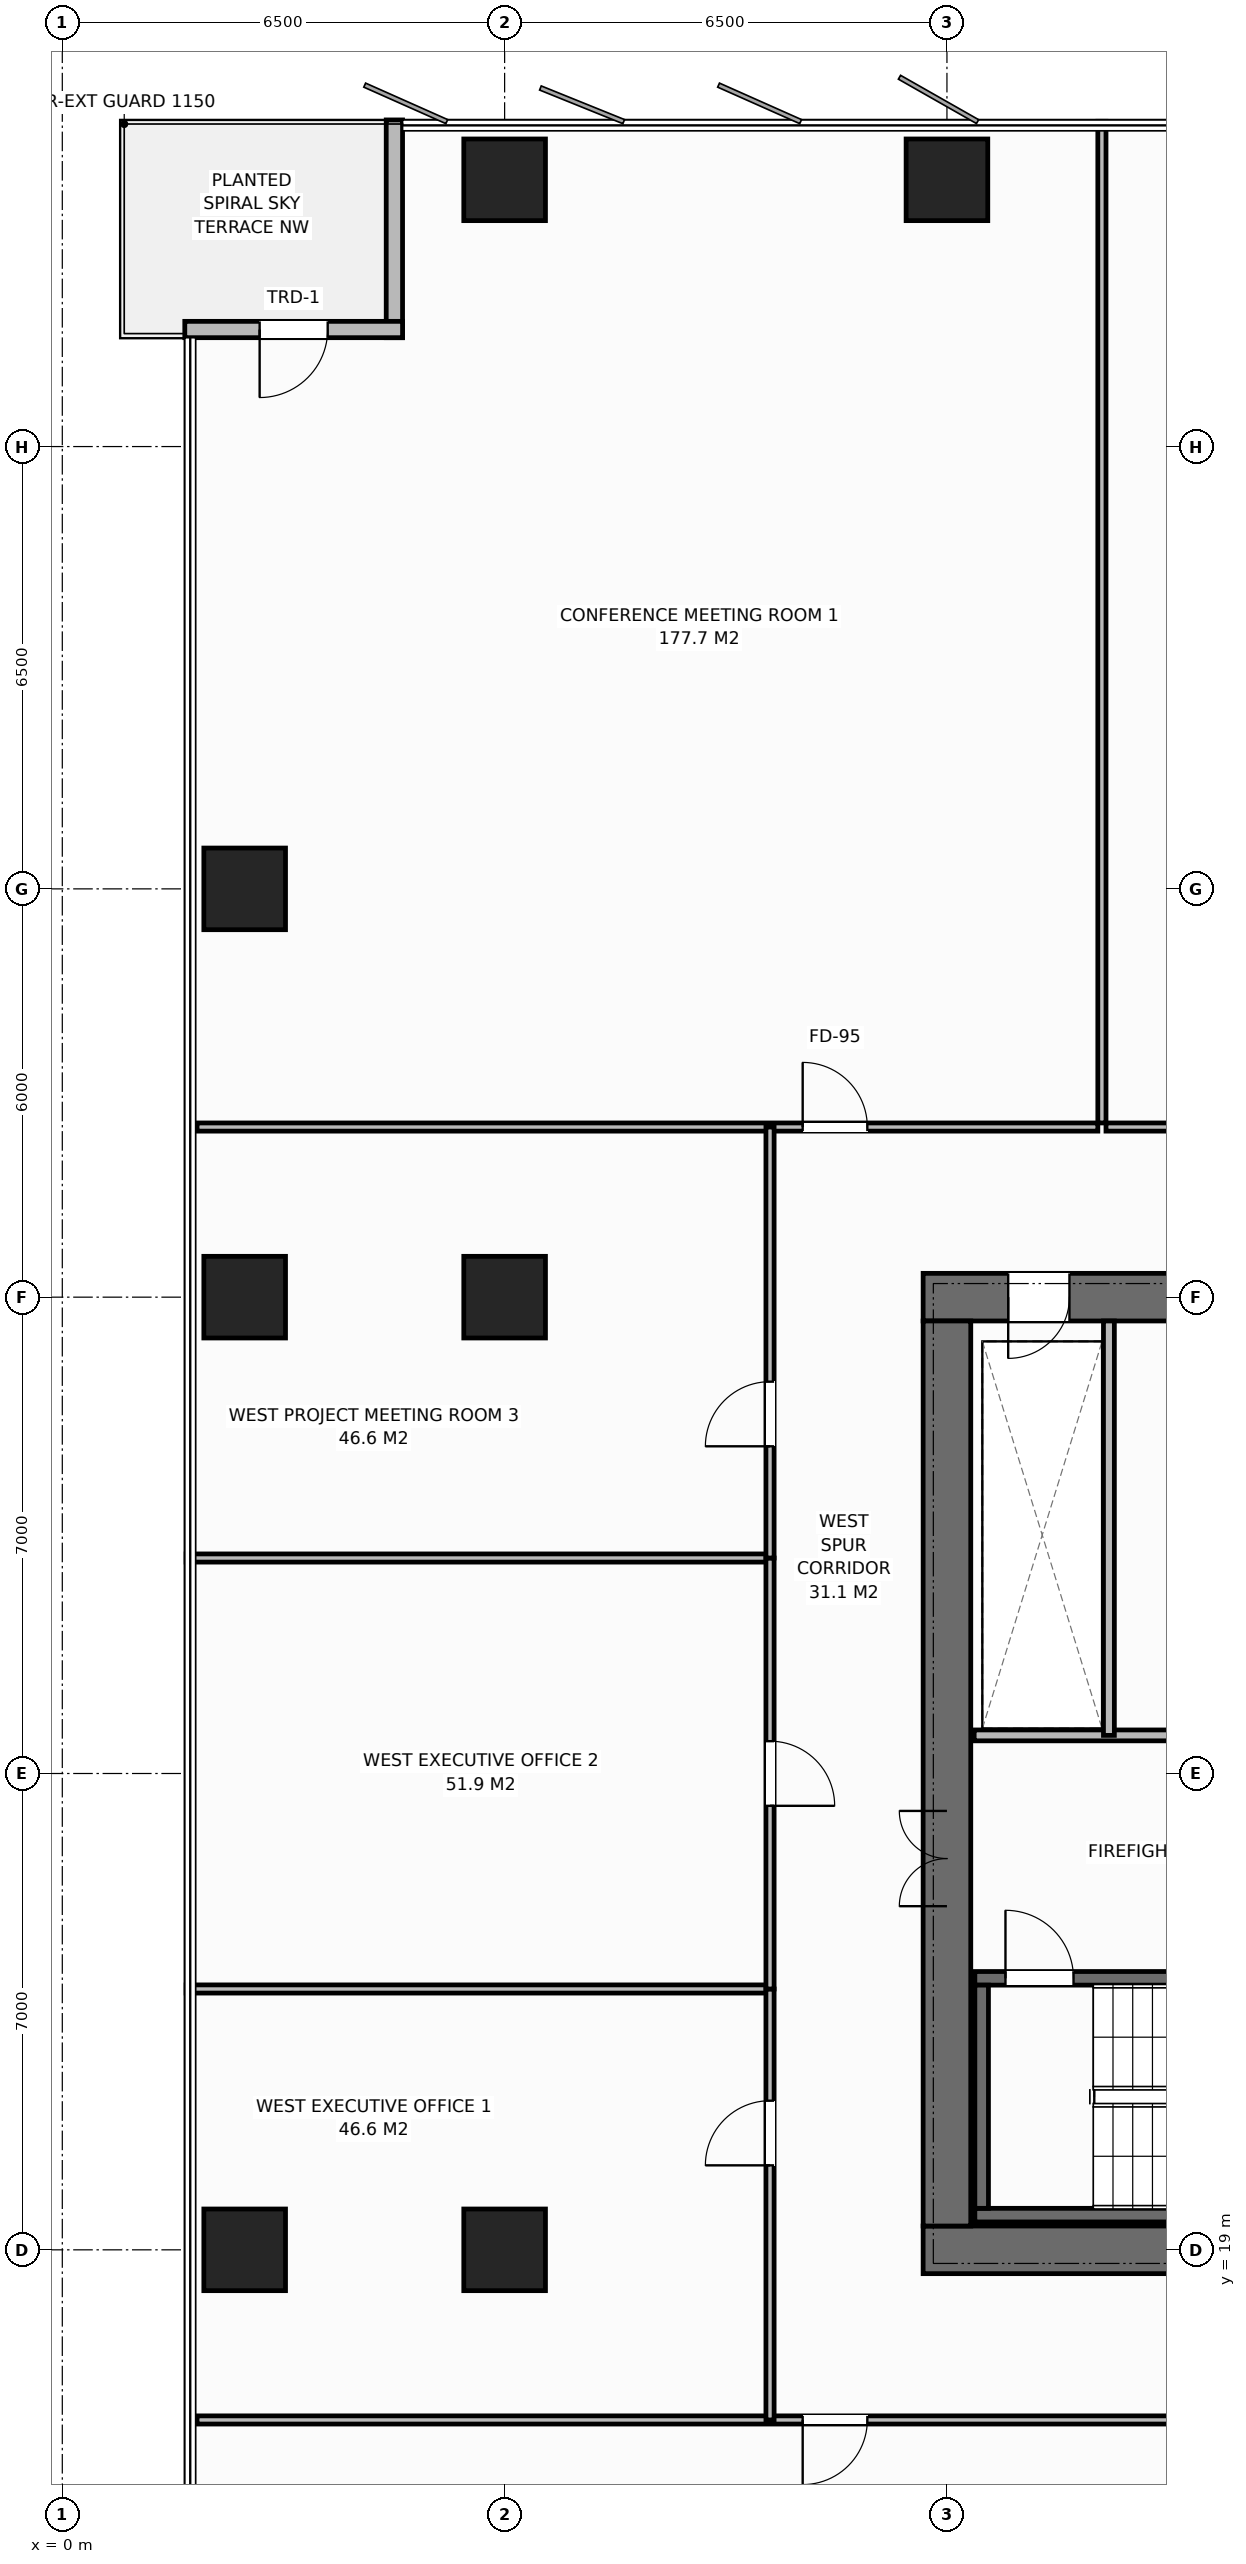
"""IFC4 building model, lengths in metres.
Left out: names, types, materials, properties, quantities, classifications, styles, units other than length and angle.
Written with IfcOpenShell. Run it as: python <this file> out.ifc"""

import sys

from ifc_helpers import new_model, si_unit, direction, frame, frame_2d, origin, origin_2d, place, context, subcontext, project, spatial, rectangle, extrude, element, fill, save


model = new_model("IFC4")
c1 = context("Model", 3, precision=1e-05, world=origin(), true_north=direction((0.0, 1.0)))
c2 = subcontext(c1, "Body", "Model", "MODEL_VIEW")
j1 = project(units=[si_unit("LENGTHUNIT", "METRE"), si_unit("PLANEANGLEUNIT", "RADIAN")], contexts=[c1])
p1 = place(None, origin())
s1 = spatial("IfcSite", under=j1, at=p1, CompositionType="ELEMENT")
p2 = place(p1, origin())
s2 = spatial("IfcBuilding", under=s1, at=p2, CompositionType="ELEMENT")
p3 = place(p2, frame((0.0, 0.0, 89.8)))
s3 = spatial("IfcBuildingStorey", under=s2, at=p3, CompositionType="ELEMENT", Elevation=89.8)
p4 = place(p3, frame((12.65, 19.0, 0.0), z_axis=(0.0, 0.0, 1.0), x_axis=(1.0, 0.0, 0.0)))
e1 = element("IfcWall", 1, at=p4, inside=s3, PredefinedType="SHEAR", context=c2, shape_type="SweptSolid", body=[
    extrude(rectangle(XDim=13.7, YDim=0.7, at=frame_2d((6.85, 0.0))), origin(), (0.0, 0.0, 1.0), 3.8),
])
p5 = place(p4, frame((9.23, 0.0, 0.0)))
e2 = element("IfcOpeningElement", 2, at=p5, cuts=e1, PredefinedType="OPENING", context=c2, shape_type="SweptSolid", body=[
    extrude(rectangle(XDim=1.4, YDim=2.2, at=frame_2d((0.7, 1.1))), frame((0.0, 0.36, 0.0), z_axis=(0.0, -1.0, 0.0), x_axis=(1.0, 0.0, 0.0)), (0.0, 0.0, 1.0), 0.72),
])
p6 = place(p3, frame((12.65, 33.0, 0.0), z_axis=(0.0, 0.0, 1.0), x_axis=(1.0, 0.0, 0.0)))
e3 = element("IfcWall", 3, at=p6, inside=s3, PredefinedType="SHEAR", context=c2, shape_type="SweptSolid", body=[
    extrude(rectangle(XDim=13.7, YDim=0.7, at=frame_2d((6.85, 0.0))), origin(), (0.0, 0.0, 1.0), 3.8),
])
p7 = place(p6, frame((1.25, 0.0, 0.0)))
e4 = element("IfcOpeningElement", 4, at=p7, cuts=e3, PredefinedType="OPENING", context=c2, shape_type="SweptSolid", body=[
    extrude(rectangle(XDim=0.9, YDim=2.15, at=frame_2d((0.45, 1.075))), frame((0.0, 0.36, 0.0), z_axis=(0.0, -1.0, 0.0), x_axis=(1.0, 0.0, 0.0)), (0.0, 0.0, 1.0), 0.72),
])
p8 = place(p6, frame((3.85, 0.0, 0.0)))
e5 = element("IfcOpeningElement", 5, at=p8, cuts=e3, PredefinedType="OPENING", context=c2, shape_type="SweptSolid", body=[
    extrude(rectangle(XDim=0.95, YDim=2.15, at=frame_2d((0.475, 1.075))), frame((0.0, 0.36, 0.0), z_axis=(0.0, -1.0, 0.0), x_axis=(1.0, 0.0, 0.0)), (0.0, 0.0, 1.0), 0.72),
])
p9 = place(p6, frame((6.85, 0.0, 0.0)))
e6 = element("IfcOpeningElement", 6, at=p9, cuts=e3, PredefinedType="OPENING", context=c2, shape_type="SweptSolid", body=[
    extrude(rectangle(XDim=0.95, YDim=2.15, at=frame_2d((0.475, 1.075))), frame((0.0, 0.36, 0.0), z_axis=(0.0, -1.0, 0.0), x_axis=(1.0, 0.0, 0.0)), (0.0, 0.0, 1.0), 0.72),
])
p10 = place(p6, frame((9.23, 0.0, 0.0)))
e7 = element("IfcOpeningElement", 7, at=p10, cuts=e3, PredefinedType="OPENING", context=c2, shape_type="SweptSolid", body=[
    extrude(rectangle(XDim=1.4, YDim=2.2, at=frame_2d((0.7, 1.1))), frame((0.0, 0.36, 0.0), z_axis=(0.0, -1.0, 0.0), x_axis=(1.0, 0.0, 0.0)), (0.0, 0.0, 1.0), 0.72),
])
p11 = place(p3, frame((13.0, 19.35, 0.0), z_axis=(0.0, 0.0, 1.0), x_axis=(0.0, 1.0, 0.0)))
e8 = element("IfcWall", 8, at=p11, inside=s3, PredefinedType="SHEAR", context=c2, shape_type="SweptSolid", body=[
    extrude(rectangle(XDim=13.3, YDim=0.7, at=frame_2d((6.65, 0.0))), origin(), (0.0, 0.0, 1.0), 3.8),
])
p12 = place(p11, frame((4.7, 0.0, 0.0)))
e9 = element("IfcOpeningElement", 9, at=p12, cuts=e8, PredefinedType="OPENING", context=c2, shape_type="SweptSolid", body=[
    extrude(rectangle(XDim=1.4, YDim=2.2, at=frame_2d((0.7, 1.1))), frame((0.0, 0.36, 0.0), z_axis=(0.0, -1.0, 0.0), x_axis=(1.0, 0.0, 0.0)), (0.0, 0.0, 1.0), 0.72),
])
p13 = place(p3, frame((13.41, 19.51, 0.0), z_axis=(0.0, 0.0, 1.0), x_axis=(1.0, 0.0, 0.0)))
e10 = element("IfcWall", 10, at=p13, inside=s3, PredefinedType="SHEAR", context=c2, shape_type="SweptSolid", body=[
    extrude(rectangle(XDim=8.43, YDim=0.2, at=frame_2d((4.215, 0.0))), origin(), (0.0, 0.0, 1.0), 3.8),
])
p14 = place(p3, frame((13.41, 22.99, 0.0), z_axis=(0.0, 0.0, 1.0), x_axis=(1.0, 0.0, 0.0)))
e11 = element("IfcWall", 11, at=p14, inside=s3, PredefinedType="SHEAR", context=c2, shape_type="SweptSolid", body=[
    extrude(rectangle(XDim=8.43, YDim=0.2, at=frame_2d((4.215, 0.0))), origin(), (0.0, 0.0, 1.0), 3.8),
])
p15 = place(p14, frame((0.45, 0.0, 0.0)))
e12 = element("IfcOpeningElement", 12, at=p15, cuts=e11, PredefinedType="OPENING", context=c2, shape_type="SweptSolid", body=[
    extrude(rectangle(XDim=1.0, YDim=2.15, at=frame_2d((0.5, 1.075))), frame((0.0, 0.11, 0.0), z_axis=(0.0, -1.0, 0.0), x_axis=(1.0, 0.0, 0.0)), (0.0, 0.0, 1.0), 0.22),
])
p16 = place(p3, frame((13.51, 19.61, 0.0), z_axis=(0.0, 0.0, 1.0), x_axis=(0.0, 1.0, 0.0)))
e13 = element("IfcWall", 13, at=p16, inside=s3, PredefinedType="SHEAR", context=c2, shape_type="SweptSolid", body=[
    extrude(rectangle(XDim=3.28, YDim=0.2, at=frame_2d((1.64, 0.0))), origin(), (0.0, 0.0, 1.0), 3.8),
])
for number, where, z_axis, x_axis in (
    (14, (6.5, 19.0, 0.0), (0.0, 0.0, 1.0), (1.0, 0.0, 0.0)),
    (15, (6.5, 33.0, 0.0), (0.0, 0.0, 1.0), (1.0, 0.0, 0.0)),
    (16, (6.5, 49.42, 0.0), (0.0, 0.0, 1.0), (1.0, 0.0, 0.0)),
    (17, (13.0, 49.42, 0.0), (0.0, 0.0, 1.0), (1.0, 0.0, 0.0)),
    (18, (2.68, 19.0, 0.0), (0.0, 0.0, 1.0), (1.0, 0.0, 0.0)),
    (19, (2.68, 33.0, 0.0), (0.0, 0.0, 1.0), (1.0, 0.0, 0.0)),
    (20, (2.68, 39.0, 0.0), (0.0, 0.0, 1.0), (1.0, 0.0, 0.0)),
):
    element("IfcColumn", number, at=place(p3, frame(where, z_axis=z_axis, x_axis=x_axis)), inside=s3, PredefinedType="COLUMN", context=c2, shape_type="SweptSolid", body=[
        extrude(rectangle(XDim=1.2, YDim=1.2, at=origin_2d()), origin(), (0.0, 0.0, 1.0), 3.8),
    ])
p17 = place(p3, frame((4.88, 47.1, 0.0), z_axis=(0.0, 0.0, 1.0), x_axis=(0.0, 1.0, 0.0)))
e21 = element("IfcWall", 21, at=p17, inside=s3, PredefinedType="STANDARD", context=c2, shape_type="SweptSolid", body=[
    extrude(rectangle(XDim=3.2, YDim=0.24, at=frame_2d((1.6, 0.0))), origin(), (0.0, 0.0, 1.0), 3.565),
])
p18 = place(p3, frame((1.8, 47.22, 0.0), z_axis=(0.0, 0.0, 1.0), x_axis=(1.0, 0.0, 0.0)))
e22 = element("IfcWall", 22, at=p18, inside=s3, PredefinedType="STANDARD", context=c2, shape_type="SweptSolid", body=[
    extrude(rectangle(XDim=3.2, YDim=0.24, at=frame_2d((1.6, 0.0))), origin(), (0.0, 0.0, 1.0), 3.565),
])
p19 = place(p18, frame((1.1, 0.0, 0.0)))
e23 = element("IfcOpeningElement", 23, at=p19, cuts=e22, PredefinedType="OPENING", context=c2, shape_type="SweptSolid", body=[
    extrude(rectangle(XDim=1.0, YDim=2.2, at=frame_2d((0.5, 1.1))), frame((0.0, 0.13, 0.0), z_axis=(0.0, -1.0, 0.0), x_axis=(1.0, 0.0, 0.0)), (0.0, 0.0, 1.0), 0.26),
])
p20 = place(p3, frame((13.4, 26.56, 0.0), z_axis=(0.0, 0.0, 1.0), x_axis=(1.0, 0.0, 0.0)))
e24 = element("IfcWall", 24, at=p20, inside=s3, PredefinedType="STANDARD", context=c2, shape_type="SweptSolid", body=[
    extrude(rectangle(XDim=8.34, YDim=0.16, at=frame_2d((4.17, 0.0))), origin(), (0.0, 0.0, 1.0), 3.565),
])
p21 = place(p3, frame((15.38, 26.56, 0.0), z_axis=(0.0, 0.0, 1.0), x_axis=(0.0, 1.0, 0.0)))
e25 = element("IfcWall", 25, at=p21, inside=s3, PredefinedType="STANDARD", context=c2, shape_type="SweptSolid", body=[
    extrude(rectangle(XDim=6.09, YDim=0.16, at=frame_2d((3.045, 0.0))), origin(), (0.0, 0.0, 1.0), 3.565),
])
p22 = place(p3, frame((15.277, 35.56, 0.0), z_axis=(0.0, 0.0, 1.0), x_axis=(0.0, 1.0, 0.0)))
e26 = element("IfcWall", 26, at=p22, inside=s3, PredefinedType="PARTITIONING", context=c2, shape_type="SweptSolid", body=[
    extrude(rectangle(XDim=14.72, YDim=0.12, at=frame_2d((7.36, 0.0))), origin(), (0.0, 0.0, 1.0), 3.565),
])
p23 = place(p3, frame((1.98, 35.5, 0.0), z_axis=(0.0, 0.0, 1.0), x_axis=(1.0, 0.0, 0.0)))
e27 = element("IfcWall", 27, at=p23, inside=s3, PredefinedType="PARTITIONING", context=c2, shape_type="SweptSolid", body=[
    extrude(rectangle(XDim=13.237, YDim=0.12, at=frame_2d((6.619, 0.0))), origin(), (0.0, 0.0, 1.0), 3.565),
])
p24 = place(p23, frame((8.9, 0.0, 0.0)))
e28 = element("IfcOpeningElement", 28, at=p24, cuts=e27, PredefinedType="OPENING", context=c2, shape_type="SweptSolid", body=[
    extrude(rectangle(XDim=0.95, YDim=2.15, at=frame_2d((0.475, 1.075))), frame((0.0, 0.07, 0.0), z_axis=(0.0, -1.0, 0.0), x_axis=(1.0, 0.0, 0.0)), (0.0, 0.0, 1.0), 0.14),
])
p25 = place(p3, frame((15.337, 35.5, 0.0), z_axis=(0.0, 0.0, 1.0), x_axis=(1.0, 0.0, 0.0)))
e29 = element("IfcWall", 29, at=p25, inside=s3, PredefinedType="PARTITIONING", context=c2, shape_type="SweptSolid", body=[
    extrude(rectangle(XDim=15.64, YDim=0.12, at=frame_2d((7.82, 0.0))), origin(), (0.0, 0.0, 1.0), 3.565),
])
p26 = place(p25, frame((7.345, 0.0, 0.0)))
e30 = element("IfcOpeningElement", 30, at=p26, cuts=e29, PredefinedType="OPENING", context=c2, shape_type="SweptSolid", body=[
    extrude(rectangle(XDim=0.95, YDim=2.15, at=frame_2d((0.475, 1.075))), frame((0.0, 0.07, 0.0), z_axis=(0.0, -1.0, 0.0), x_axis=(1.0, 0.0, 0.0)), (0.0, 0.0, 1.0), 0.14),
])
p27 = place(p3, frame((1.98, 16.5, 0.0), z_axis=(0.0, 0.0, 1.0), x_axis=(1.0, 0.0, 0.0)))
e31 = element("IfcWall", 31, at=p27, inside=s3, PredefinedType="PARTITIONING", context=c2, shape_type="SweptSolid", body=[
    extrude(rectangle(XDim=24.203, YDim=0.12, at=frame_2d((12.102, 0.0))), origin(), (0.0, 0.0, 1.0), 3.565),
])
p28 = place(p27, frame((8.9, 0.0, 0.0)))
e32 = element("IfcOpeningElement", 32, at=p28, cuts=e31, PredefinedType="OPENING", context=c2, shape_type="SweptSolid", body=[
    extrude(rectangle(XDim=0.95, YDim=2.15, at=frame_2d((0.475, 1.075))), frame((0.0, 0.07, 0.0), z_axis=(0.0, -1.0, 0.0), x_axis=(1.0, 0.0, 0.0)), (0.0, 0.0, 1.0), 0.14),
])
p29 = place(p3, frame((1.82, 22.833, 0.0), z_axis=(0.0, 0.0, 1.0), x_axis=(1.0, 0.0, 0.0)))
e33 = element("IfcWall", 33, at=p29, inside=s3, PredefinedType="PARTITIONING", context=c2, shape_type="SweptSolid", body=[
    extrude(rectangle(XDim=8.58, YDim=0.12, at=frame_2d((4.29, 0.0))), origin(), (0.0, 0.0, 1.0), 3.565),
])
p30 = place(p3, frame((10.4, 16.5, 0.0), z_axis=(0.0, 0.0, 1.0), x_axis=(0.0, 1.0, 0.0)))
e34 = element("IfcWall", 34, at=p30, inside=s3, PredefinedType="PARTITIONING", context=c2, shape_type="SweptSolid", body=[
    extrude(rectangle(XDim=6.333, YDim=0.12, at=frame_2d((3.167, 0.0))), origin(), (0.0, 0.0, 1.0), 3.565),
])
p31 = place(p30, frame((3.742, 0.0, 0.0)))
e35 = element("IfcOpeningElement", 35, at=p31, cuts=e34, PredefinedType="OPENING", context=c2, shape_type="SweptSolid", body=[
    extrude(rectangle(XDim=0.95, YDim=2.15, at=frame_2d((0.475, 1.075))), frame((0.0, 0.07, 0.0), z_axis=(0.0, -1.0, 0.0), x_axis=(1.0, 0.0, 0.0)), (0.0, 0.0, 1.0), 0.14),
])
p32 = place(p3, frame((1.82, 29.167, 0.0), z_axis=(0.0, 0.0, 1.0), x_axis=(1.0, 0.0, 0.0)))
e36 = element("IfcWall", 36, at=p32, inside=s3, PredefinedType="PARTITIONING", context=c2, shape_type="SweptSolid", body=[
    extrude(rectangle(XDim=8.58, YDim=0.12, at=frame_2d((4.29, 0.0))), origin(), (0.0, 0.0, 1.0), 3.565),
])
p33 = place(p3, frame((10.4, 22.833, 0.0), z_axis=(0.0, 0.0, 1.0), x_axis=(0.0, 1.0, 0.0)))
e37 = element("IfcWall", 37, at=p33, inside=s3, PredefinedType="PARTITIONING", context=c2, shape_type="SweptSolid", body=[
    extrude(rectangle(XDim=6.333, YDim=0.12, at=frame_2d((3.167, 0.0))), origin(), (0.0, 0.0, 1.0), 3.565),
])
p34 = place(p33, frame((2.692, 0.0, 0.0)))
e38 = element("IfcOpeningElement", 38, at=p34, cuts=e37, PredefinedType="OPENING", context=c2, shape_type="SweptSolid", body=[
    extrude(rectangle(XDim=0.95, YDim=2.15, at=frame_2d((0.475, 1.075))), frame((0.0, 0.07, 0.0), z_axis=(0.0, -1.0, 0.0), x_axis=(1.0, 0.0, 0.0)), (0.0, 0.0, 1.0), 0.14),
])
p35 = place(p3, frame((10.4, 29.167, 0.0), z_axis=(0.0, 0.0, 1.0), x_axis=(0.0, 1.0, 0.0)))
e39 = element("IfcWall", 39, at=p35, inside=s3, PredefinedType="PARTITIONING", context=c2, shape_type="SweptSolid", body=[
    extrude(rectangle(XDim=6.333, YDim=0.12, at=frame_2d((3.167, 0.0))), origin(), (0.0, 0.0, 1.0), 3.565),
])
p36 = place(p35, frame((1.642, 0.0, 0.0)))
e40 = element("IfcOpeningElement", 40, at=p36, cuts=e39, PredefinedType="OPENING", context=c2, shape_type="SweptSolid", body=[
    extrude(rectangle(XDim=0.95, YDim=2.15, at=frame_2d((0.475, 1.075))), frame((0.0, 0.07, 0.0), z_axis=(0.0, -1.0, 0.0), x_axis=(1.0, 0.0, 0.0)), (0.0, 0.0, 1.0), 0.14),
])
p37 = place(p19, origin())
e41 = element("IfcDoor", 41, at=p37, inside=s3, OperationType="SINGLE_SWING_RIGHT", PredefinedType="DOOR", context=c2, shape_type="SweptSolid", body=[
    extrude(rectangle(XDim=1.0, YDim=2.2, at=frame_2d((0.5, 1.1))), frame((0.0, 0.025, 0.0), z_axis=(0.0, -1.0, 0.0), x_axis=(1.0, 0.0, 0.0)), (0.0, 0.0, 1.0), 0.05),
])
fill(e23, e41)
p38 = place(p15, origin())
e42 = element("IfcDoor", 42, at=p38, inside=s3, OperationType="SINGLE_SWING_LEFT", PredefinedType="DOOR", context=c2, shape_type="SweptSolid", body=[
    extrude(rectangle(XDim=1.0, YDim=2.15, at=frame_2d((0.5, 1.075))), frame((0.0, 0.025, 0.0), z_axis=(0.0, -1.0, 0.0), x_axis=(1.0, 0.0, 0.0)), (0.0, 0.0, 1.0), 0.05),
])
fill(e12, e42)
p39 = place(p12, origin())
e43 = element("IfcDoor", 43, at=p39, inside=s3, OperationType="DOUBLE_DOOR_SINGLE_SWING", PredefinedType="DOOR", context=c2, shape_type="SweptSolid", body=[
    extrude(rectangle(XDim=1.4, YDim=2.2, at=frame_2d((0.7, 1.1))), frame((0.0, 0.025, 0.0), z_axis=(0.0, -1.0, 0.0), x_axis=(1.0, 0.0, 0.0)), (0.0, 0.0, 1.0), 0.05),
])
fill(e9, e43)
p40 = place(p7, origin())
e44 = element("IfcDoor", 44, at=p40, inside=s3, OperationType="SINGLE_SWING_RIGHT", PredefinedType="DOOR", context=c2, shape_type="SweptSolid", body=[
    extrude(rectangle(XDim=0.9, YDim=2.15, at=frame_2d((0.45, 1.075))), frame((0.0, -0.075, 0.0), z_axis=(0.0, -1.0, 0.0), x_axis=(1.0, 0.0, 0.0)), (0.0, 0.0, 1.0), 0.05),
])
fill(e4, e44)
p41 = place(p24, origin())
e45 = element("IfcDoor", 45, at=p41, inside=s3, OperationType="SINGLE_SWING_LEFT", PredefinedType="DOOR", context=c2, shape_type="SweptSolid", body=[
    extrude(rectangle(XDim=0.95, YDim=2.15, at=frame_2d((0.475, 1.075))), frame((0.0, 0.025, 0.0), z_axis=(0.0, -1.0, 0.0), x_axis=(1.0, 0.0, 0.0)), (0.0, 0.0, 1.0), 0.05),
])
fill(e28, e45)
p42 = place(p28, origin())
e46 = element("IfcDoor", 46, at=p42, inside=s3, OperationType="SINGLE_SWING_RIGHT", PredefinedType="DOOR", context=c2, shape_type="SweptSolid", body=[
    extrude(rectangle(XDim=0.95, YDim=2.15, at=frame_2d((0.475, 1.075))), frame((0.0, 0.025, 0.0), z_axis=(0.0, -1.0, 0.0), x_axis=(1.0, 0.0, 0.0)), (0.0, 0.0, 1.0), 0.05),
])
fill(e32, e46)
p43 = place(p31, origin())
e47 = element("IfcDoor", 47, at=p43, inside=s3, OperationType="SINGLE_SWING_LEFT", PredefinedType="DOOR", context=c2, shape_type="SweptSolid", body=[
    extrude(rectangle(XDim=0.95, YDim=2.15, at=frame_2d((0.475, 1.075))), frame((0.0, 0.025, 0.0), z_axis=(0.0, -1.0, 0.0), x_axis=(1.0, 0.0, 0.0)), (0.0, 0.0, 1.0), 0.05),
])
fill(e35, e47)
p44 = place(p34, origin())
e48 = element("IfcDoor", 48, at=p44, inside=s3, OperationType="SINGLE_SWING_RIGHT", PredefinedType="DOOR", context=c2, shape_type="SweptSolid", body=[
    extrude(rectangle(XDim=0.95, YDim=2.15, at=frame_2d((0.475, 1.075))), frame((0.0, 0.025, 0.0), z_axis=(0.0, -1.0, 0.0), x_axis=(1.0, 0.0, 0.0)), (0.0, 0.0, 1.0), 0.05),
])
fill(e38, e48)
p45 = place(p36, origin())
e49 = element("IfcDoor", 49, at=p45, inside=s3, OperationType="SINGLE_SWING_LEFT", PredefinedType="DOOR", context=c2, shape_type="SweptSolid", body=[
    extrude(rectangle(XDim=0.95, YDim=2.15, at=frame_2d((0.475, 1.075))), frame((0.0, 0.025, 0.0), z_axis=(0.0, -1.0, 0.0), x_axis=(1.0, 0.0, 0.0)), (0.0, 0.0, 1.0), 0.05),
])
fill(e40, e49)
save(model, sys.argv[1])
